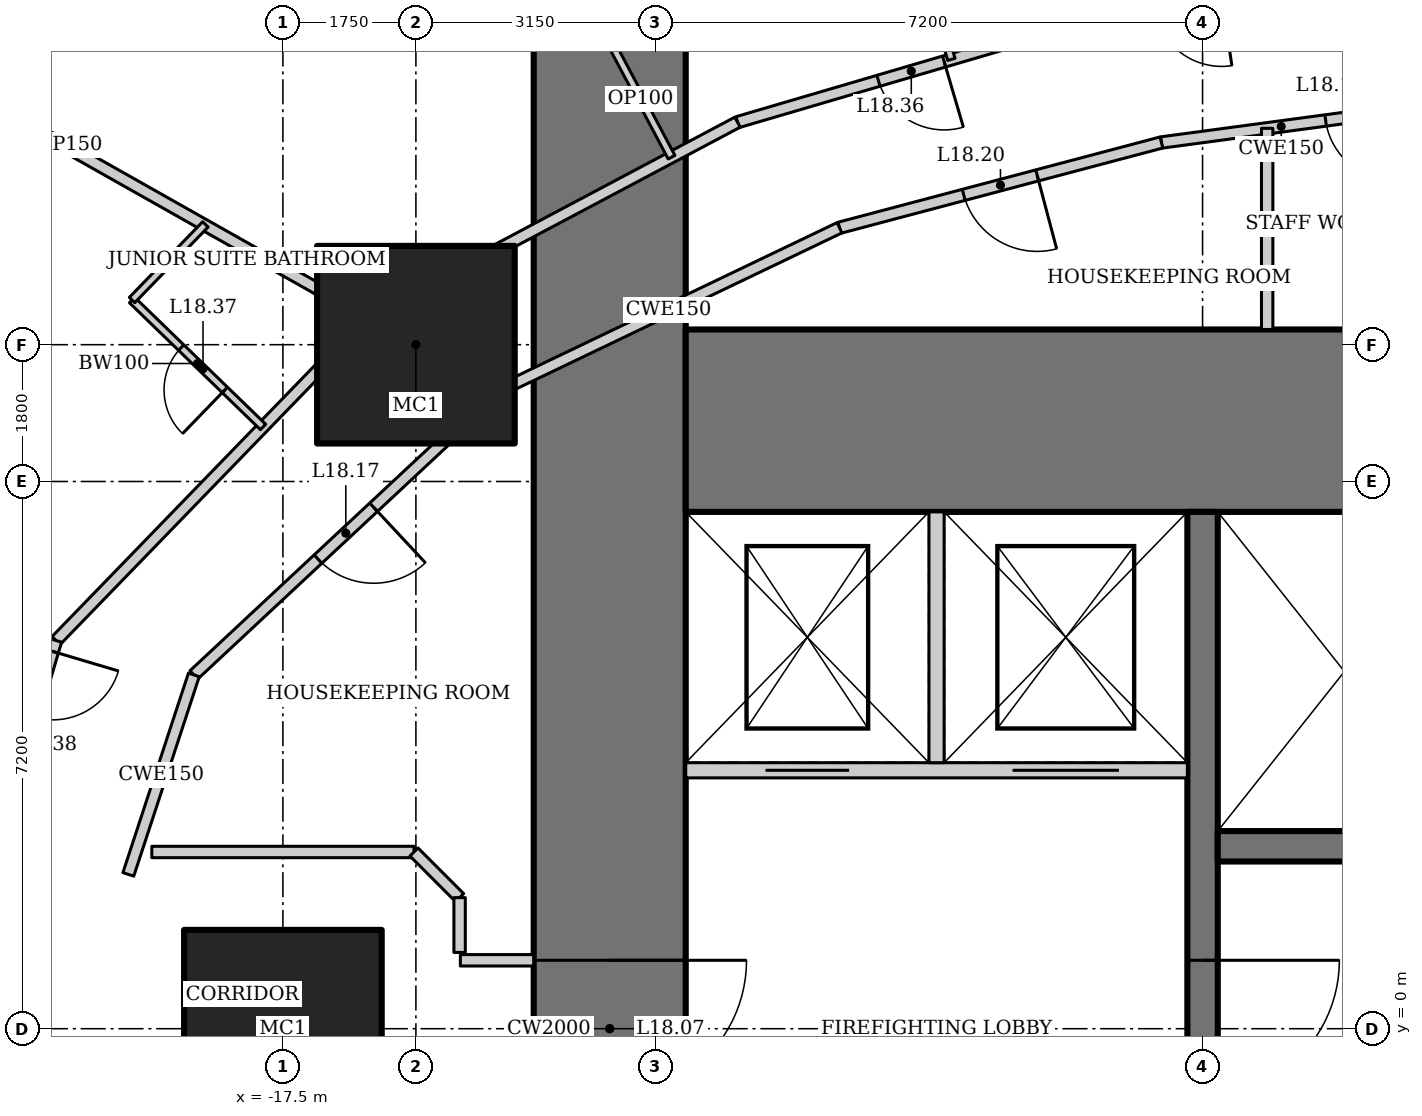
"""IFC4 building model, lengths in metres.
Left out: names, types, materials, properties, quantities, classifications, styles, units other than length and angle.
Written with IfcOpenShell. Run it as: python <this file> out.ifc"""

import sys

from ifc_helpers import new_model, si_unit, direction, frame, frame_2d, origin, origin_2d, place, context, subcontext, project, spatial, rectangle, hollow_rectangle, extrude, element, fill, save


model = new_model("IFC4")
c1 = context("Model", 3, precision=1e-05, world=origin(), true_north=direction((0.0, 1.0)))
c2 = subcontext(c1, "Body", "Model", "MODEL_VIEW")
j1 = project(units=[si_unit("LENGTHUNIT", "METRE"), si_unit("PLANEANGLEUNIT", "RADIAN")], contexts=[c1])
p1 = place(None, origin())
s1 = spatial("IfcSite", under=j1, at=p1, CompositionType="ELEMENT")
p2 = place(p1, origin())
s2 = spatial("IfcBuilding", under=s1, at=p2, CompositionType="ELEMENT")
p3 = place(p2, frame((0.0, 0.0, 80.2)))
s3 = spatial("IfcBuildingStorey", under=s2, at=p3, CompositionType="ELEMENT", Elevation=80.2)
for number, where, z_axis, x_axis in (
    (1, (-15.75, 9.0, 0.0), (0.0, 0.0, 1.0), (1.0, 0.0, 0.0)),
    (2, (-17.5, 0.0, 0.0), (0.0, 0.0, 1.0), (1.0, 0.0, 0.0)),
):
    element("IfcColumn", number, at=place(p3, frame(where, z_axis=z_axis, x_axis=x_axis)), inside=s3, PredefinedType="COLUMN", context=c2, shape_type="SweptSolid", body=[
        extrude(hollow_rectangle(XDim=2.6, YDim=2.6, WallThickness=0.13, at=origin_2d()), origin(), (0.0, 0.0, 1.0), 3.6),
    ])
p4 = place(p3, frame((-13.2, 13.0, 0.0), z_axis=(0.0, 0.0, 1.0), x_axis=(0.0, -1.0, 0.0)))
e3 = element("IfcWall", 3, at=p4, inside=s3, PredefinedType="SHEAR", context=c2, shape_type="SweptSolid", body=[
    extrude(rectangle(XDim=26.0, YDim=2.0, at=frame_2d((13.0, 0.0))), origin(), (0.0, 0.0, 1.0), 3.6),
])
p5 = place(p4, frame((12.1, 0.0, 0.0)))
e4 = element("IfcOpeningElement", 4, at=p5, cuts=e3, PredefinedType="OPENING", context=c2, shape_type="SweptSolid", body=[
    extrude(rectangle(XDim=1.8, YDim=2.1, at=frame_2d((0.9, 1.05))), frame((0.0, 1.01, 0.0), z_axis=(0.0, -1.0, 0.0), x_axis=(1.0, 0.0, 0.0)), (0.0, 0.0, 1.0), 2.02),
])
p6 = place(p3, frame((12.2, 8.0, 0.0), z_axis=(0.0, 0.0, 1.0), x_axis=(-1.0, 0.0, 0.0)))
e5 = element("IfcWall", 5, at=p6, inside=s3, PredefinedType="SHEAR", context=c2, shape_type="SweptSolid", body=[
    extrude(rectangle(XDim=24.4, YDim=2.4, at=frame_2d((12.2, 0.0))), origin(), (0.0, 0.0, 1.0), 3.6),
])
p7 = place(p3, frame((-5.4, 6.8, 0.0), z_axis=(0.0, 0.0, 1.0), x_axis=(0.0, -1.0, 0.0)))
e6 = element("IfcWall", 6, at=p7, inside=s3, PredefinedType="SHEAR", context=c2, shape_type="SweptSolid", body=[
    extrude(rectangle(XDim=13.6, YDim=0.4, at=frame_2d((6.8, 0.0))), origin(), (0.0, 0.0, 1.0), 3.6),
])
p8 = place(p7, frame((5.9, 0.0, 0.0)))
e7 = element("IfcOpeningElement", 7, at=p8, cuts=e6, PredefinedType="OPENING", context=c2, shape_type="SweptSolid", body=[
    extrude(rectangle(XDim=1.8, YDim=2.1, at=frame_2d((0.9, 1.05))), frame((0.0, 0.21, 0.0), z_axis=(0.0, -1.0, 0.0), x_axis=(1.0, 0.0, 0.0)), (0.0, 0.0, 1.0), 0.42),
])
p9 = place(p3, frame((5.2, 2.4, 0.0), z_axis=(0.0, 0.0, 1.0), x_axis=(-1.0, 0.0, 0.0)))
e8 = element("IfcWall", 8, at=p9, inside=s3, PredefinedType="SHEAR", context=c2, shape_type="SweptSolid", body=[
    extrude(rectangle(XDim=10.4, YDim=0.4, at=frame_2d((5.2, 0.0))), origin(), (0.0, 0.0, 1.0), 3.6),
])
p10 = place(p3, frame((-12.2, 3.4, 0.0), z_axis=(0.0, 0.0, 1.0), x_axis=(1.0, 0.0, 0.0)))
e9 = element("IfcWall", 9, at=p10, inside=s3, PredefinedType="SOLIDWALL", context=c2, shape_type="SweptSolid", body=[
    extrude(rectangle(XDim=6.6, YDim=0.2, at=frame_2d((3.3, 0.0))), origin(), (0.0, 0.0, 1.0), 3.6),
])
p11 = place(p10, frame((1.05, 0.0, 0.0)))
e10 = element("IfcOpeningElement", 10, at=p11, cuts=e9, PredefinedType="OPENING", context=c2, shape_type="SweptSolid", body=[
    extrude(rectangle(XDim=1.1, YDim=2.2, at=frame_2d((0.55, 1.1))), frame((0.0, 0.11, 0.0), z_axis=(0.0, -1.0, 0.0), x_axis=(1.0, 0.0, 0.0)), (0.0, 0.0, 1.0), 0.22),
])
p12 = place(p10, frame((4.3, 0.0, 0.0)))
e11 = element("IfcOpeningElement", 11, at=p12, cuts=e9, PredefinedType="OPENING", context=c2, shape_type="SweptSolid", body=[
    extrude(rectangle(XDim=1.4, YDim=2.2, at=frame_2d((0.7, 1.1))), frame((0.0, 0.11, 0.0), z_axis=(0.0, -1.0, 0.0), x_axis=(1.0, 0.0, 0.0)), (0.0, 0.0, 1.0), 0.22),
])
p13 = place(p3, frame((-8.9, 3.5, 0.0), z_axis=(0.0, 0.0, 1.0), x_axis=(0.0, 1.0, 0.0)))
e12 = element("IfcWall", 12, at=p13, inside=s3, PredefinedType="SOLIDWALL", context=c2, shape_type="SweptSolid", body=[
    extrude(rectangle(XDim=3.3, YDim=0.2, at=frame_2d((1.65, 0.0))), origin(), (0.0, 0.0, 1.0), 3.6),
])
p14 = place(p3, frame((-24.435, 13.909, 0.0), z_axis=(0.0, 0.0, 1.0), x_axis=(0.870744406136, -0.491735883563, 0.0)))
e13 = element("IfcWall", 13, at=p14, inside=s3, PredefinedType="PARTITIONING", context=c2, shape_type="SweptSolid", body=[
    extrude(rectangle(XDim=9.263, YDim=0.15, at=frame_2d((4.631, 0.0))), origin(), (0.0, 0.0, 1.0), 2.693),
])
p15 = place(p3, frame((-6.786, 13.317, 0.0), z_axis=(0.0, 0.0, 1.0), x_axis=(-0.959496227294, -0.281721475589, 0.0)))
e14 = element("IfcWall", 14, at=p15, inside=s3, PredefinedType="PARTITIONING", context=c2, shape_type="SweptSolid", body=[
    extrude(rectangle(XDim=4.933, YDim=0.15, at=frame_2d((2.466, 0.0))), origin(), (0.0, 0.0, 1.0), 3.45),
])
p16 = place(p15, frame((2.1, 0.0, 0.0)))
e15 = element("IfcOpeningElement", 15, at=p16, cuts=e14, PredefinedType="OPENING", context=c2, shape_type="SweptSolid", body=[
    extrude(rectangle(XDim=0.9, YDim=2.1, at=frame_2d((0.45, 1.05))), frame((0.0, 0.085, 0.0), z_axis=(0.0, -1.0, 0.0), x_axis=(1.0, 0.0, 0.0)), (0.0, 0.0, 1.0), 0.17),
])
p17 = place(p3, frame((-11.519, 11.928, 0.0), z_axis=(0.0, 0.0, 1.0), x_axis=(-0.883334368785, -0.468743419071, 0.0)))
e16 = element("IfcWall", 16, at=p17, inside=s3, PredefinedType="PARTITIONING", context=c2, shape_type="SweptSolid", body=[
    extrude(rectangle(XDim=5.491, YDim=0.15, at=frame_2d((2.746, 0.0))), origin(), (0.0, 0.0, 1.0), 3.45),
])
p18 = place(p3, frame((-16.369, 9.354, 0.0), z_axis=(0.0, 0.0, 1.0), x_axis=(-0.695871090686, -0.71816671125, 0.0)))
e17 = element("IfcWall", 17, at=p18, inside=s3, PredefinedType="PARTITIONING", context=c2, shape_type="SweptSolid", body=[
    extrude(rectangle(XDim=5.913, YDim=0.15, at=frame_2d((2.957, 0.0))), origin(), (0.0, 0.0, 1.0), 3.45),
])
p19 = place(p3, frame((-20.484, 5.107, 0.0), z_axis=(0.0, 0.0, 1.0), x_axis=(-0.284584469409, -0.95865096869, 0.0)))
e18 = element("IfcWall", 18, at=p19, inside=s3, PredefinedType="PARTITIONING", context=c2, shape_type="SweptSolid", body=[
    extrude(rectangle(XDim=5.327, YDim=0.15, at=frame_2d((2.664, 0.0))), origin(), (0.0, 0.0, 1.0), 3.45),
])
p20 = place(p19, frame((0.15, 0.0, 0.0)))
e19 = element("IfcOpeningElement", 19, at=p20, cuts=e18, PredefinedType="OPENING", context=c2, shape_type="SweptSolid", body=[
    extrude(rectangle(XDim=0.9, YDim=2.1, at=frame_2d((0.45, 1.05))), frame((0.0, 0.085, 0.0), z_axis=(0.0, -1.0, 0.0), x_axis=(1.0, 0.0, 0.0)), (0.0, 0.0, 1.0), 0.17),
])
p21 = place(p3, frame((-22.0, 0.0, 0.0), z_axis=(0.0, 0.0, 1.0), x_axis=(0.284584469409, -0.95865096869, 0.0)))
e20 = element("IfcWall", 20, at=p21, inside=s3, PredefinedType="PARTITIONING", context=c2, shape_type="SweptSolid", body=[
    extrude(rectangle(XDim=5.327, YDim=0.15, at=frame_2d((2.664, 0.0))), origin(), (0.0, 0.0, 1.0), 3.45),
])
p22 = place(p3, frame((-2.79, 12.083, 0.0), z_axis=(0.0, 0.0, 1.0), x_axis=(-0.991129053928, -0.13290296633, 0.0)))
e21 = element("IfcWall", 21, at=p22, inside=s3, PredefinedType="PARTITIONING", context=c2, shape_type="SweptSolid", body=[
    extrude(rectangle(XDim=3.18, YDim=0.15, at=frame_2d((1.59, 0.0))), origin(), (0.0, 0.0, 1.0), 3.45),
])
p23 = place(p22, frame((0.1, 0.0, 0.0)))
e22 = element("IfcOpeningElement", 22, at=p23, cuts=e21, PredefinedType="OPENING", context=c2, shape_type="SweptSolid", body=[
    extrude(rectangle(XDim=0.9, YDim=2.1, at=frame_2d((0.45, 1.05))), frame((0.0, 0.085, 0.0), z_axis=(0.0, -1.0, 0.0), x_axis=(1.0, 0.0, 0.0)), (0.0, 0.0, 1.0), 0.17),
])
p24 = place(p3, frame((-5.941, 11.66, 0.0), z_axis=(0.0, 0.0, 1.0), x_axis=(-0.966672790407, -0.256015070428, 0.0)))
e23 = element("IfcWall", 23, at=p24, inside=s3, PredefinedType="PARTITIONING", context=c2, shape_type="SweptSolid", body=[
    extrude(rectangle(XDim=4.382, YDim=0.15, at=frame_2d((2.191, 0.0))), origin(), (0.0, 0.0, 1.0), 3.45),
])
p25 = place(p24, frame((1.691, 0.0, 0.0)))
e24 = element("IfcOpeningElement", 24, at=p25, cuts=e23, PredefinedType="OPENING", context=c2, shape_type="SweptSolid", body=[
    extrude(rectangle(XDim=1.0, YDim=2.1, at=frame_2d((0.5, 1.05))), frame((0.0, 0.085, 0.0), z_axis=(0.0, -1.0, 0.0), x_axis=(1.0, 0.0, 0.0)), (0.0, 0.0, 1.0), 0.17),
])
p26 = place(p3, frame((-10.177, 10.539, 0.0), z_axis=(0.0, 0.0, 1.0), x_axis=(-0.901869692799, -0.43200816799, 0.0)))
e25 = element("IfcWall", 25, at=p26, inside=s3, PredefinedType="PARTITIONING", context=c2, shape_type="SweptSolid", body=[
    extrude(rectangle(XDim=4.986, YDim=0.15, at=frame_2d((2.493, 0.0))), origin(), (0.0, 0.0, 1.0), 3.45),
])
p27 = place(p3, frame((-14.673, 8.385, 0.0), z_axis=(0.0, 0.0, 1.0), x_axis=(-0.731260145007, -0.682098673452, 0.0)))
e26 = element("IfcWall", 26, at=p27, inside=s3, PredefinedType="PARTITIONING", context=c2, shape_type="SweptSolid", body=[
    extrude(rectangle(XDim=5.468, YDim=0.15, at=frame_2d((2.734, 0.0))), origin(), (0.0, 0.0, 1.0), 3.45),
])
p28 = place(p27, frame((2.234, 0.0, 0.0)))
e27 = element("IfcOpeningElement", 27, at=p28, cuts=e26, PredefinedType="OPENING", context=c2, shape_type="SweptSolid", body=[
    extrude(rectangle(XDim=1.0, YDim=2.1, at=frame_2d((0.5, 1.05))), frame((0.0, 0.085, 0.0), z_axis=(0.0, -1.0, 0.0), x_axis=(1.0, 0.0, 0.0)), (0.0, 0.0, 1.0), 0.17),
])
p29 = place(p3, frame((-4.55, 9.2, 0.0), z_axis=(0.0, 0.0, 1.0), x_axis=(0.0, 1.0, 0.0)))
e28 = element("IfcWall", 28, at=p29, inside=s3, PredefinedType="SOLIDWALL", context=c2, shape_type="SweptSolid", body=[
    extrude(rectangle(XDim=2.647, YDim=0.15, at=frame_2d((1.323, 0.0))), origin(), (0.0, 0.0, 1.0), 3.45),
])
p30 = place(p3, frame((-8.705, 12.754, 0.0), z_axis=(0.0, 0.0, 1.0), x_axis=(-0.281659633817, 0.959514382736, 0.0)))
e29 = element("IfcWall", 29, at=p30, inside=s3, PredefinedType="PARTITIONING", context=c2, shape_type="SweptSolid", body=[
    extrude(rectangle(XDim=2.4, YDim=0.1, at=frame_2d((1.2, 0.0))), origin(), (0.0, 0.0, 1.0), 3.45),
])
p31 = place(p30, frame((0.7, 0.0, 0.0)))
e30 = element("IfcOpeningElement", 30, at=p31, cuts=e29, PredefinedType="OPENING", context=c2, shape_type="SweptSolid", body=[
    extrude(rectangle(XDim=0.8, YDim=2.1, at=frame_2d((0.4, 1.05))), frame((0.0, 0.06, 0.0), z_axis=(0.0, -1.0, 0.0), x_axis=(1.0, 0.0, 0.0)), (0.0, 0.0, 1.0), 0.12),
])
p32 = place(p3, frame((-17.761, 7.917, 0.0), z_axis=(0.0, 0.0, 1.0), x_axis=(-0.718157610206, 0.695880483204, 0.0)))
e31 = element("IfcWall", 31, at=p32, inside=s3, PredefinedType="PARTITIONING", context=c2, shape_type="SweptSolid", body=[
    extrude(rectangle(XDim=2.4, YDim=0.1, at=frame_2d((1.2, 0.0))), origin(), (0.0, 0.0, 1.0), 3.45),
])
p33 = place(p32, frame((0.7, 0.0, 0.0)))
e32 = element("IfcOpeningElement", 32, at=p33, cuts=e31, PredefinedType="OPENING", context=c2, shape_type="SweptSolid", body=[
    extrude(rectangle(XDim=0.8, YDim=2.1, at=frame_2d((0.4, 1.05))), frame((0.0, 0.06, 0.0), z_axis=(0.0, -1.0, 0.0), x_axis=(1.0, 0.0, 0.0)), (0.0, 0.0, 1.0), 0.12),
])
p34 = place(p3, frame((-19.484, 9.588, 0.0), z_axis=(0.0, 0.0, 1.0), x_axis=(0.695920174922, 0.718119147591, 0.0)))
e33 = element("IfcWall", 33, at=p34, inside=s3, PredefinedType="PARTITIONING", context=c2, shape_type="SweptSolid", body=[
    extrude(rectangle(XDim=1.386, YDim=0.1, at=frame_2d((0.693, 0.0))), origin(), (0.0, 0.0, 1.0), 3.45),
])
p35 = place(p3, frame((-13.2, 13.0, 0.0), z_axis=(0.0, 0.0, 1.0), x_axis=(0.46874717052, -0.88333237806, 0.0)))
e34 = element("IfcWall", 34, at=p35, inside=s3, PredefinedType="PARTITIONING", context=c2, shape_type="SweptSolid", body=[
    extrude(rectangle(XDim=1.735, YDim=0.1, at=frame_2d((0.868, 0.0))), origin(), (0.0, 0.0, 1.0), 3.45),
])
p36 = place(p3, frame((-18.672, 4.655, 0.0), z_axis=(0.0, 0.0, 1.0), x_axis=(-0.311929965981, -0.950105097515, 0.0)))
e35 = element("IfcWall", 35, at=p36, inside=s3, PredefinedType="PARTITIONING", context=c2, shape_type="SweptSolid", body=[
    extrude(rectangle(XDim=2.763, YDim=0.15, at=frame_2d((1.381, 0.0))), origin(), (0.0, 0.0, 1.0), 3.45),
])
p37 = place(p3, frame((-14.2, 0.9, 0.0), z_axis=(0.0, 0.0, 1.0), x_axis=(-1.0, 0.0, 0.0)))
e36 = element("IfcWall", 36, at=p37, inside=s3, PredefinedType="PARTITIONING", context=c2, shape_type="SweptSolid", body=[
    extrude(rectangle(XDim=0.965, YDim=0.15, at=frame_2d((0.482, 0.0))), origin(), (0.0, 0.0, 1.0), 3.45),
])
p38 = place(p3, frame((-19.225, 2.325, 0.0), z_axis=(0.0, 0.0, 1.0), x_axis=(1.0, 0.0, 0.0)))
e37 = element("IfcWall", 37, at=p38, inside=s3, PredefinedType="PARTITIONING", context=c2, shape_type="SweptSolid", body=[
    extrude(rectangle(XDim=3.449, YDim=0.15, at=frame_2d((1.725, 0.0))), origin(), (0.0, 0.0, 1.0), 3.45),
])
p39 = place(p3, frame((-15.775, 2.325, 0.0), z_axis=(0.0, 0.0, 1.0), x_axis=(0.707106781187, -0.707106781187, 0.0)))
e38 = element("IfcWall", 38, at=p39, inside=s3, PredefinedType="PARTITIONING", context=c2, shape_type="SweptSolid", body=[
    extrude(rectangle(XDim=0.849, YDim=0.15, at=frame_2d((0.425, 0.0))), origin(), (0.0, 0.0, 1.0), 3.45),
])
p40 = place(p3, frame((-15.175, 1.725, 0.0), z_axis=(0.0, 0.0, 1.0), x_axis=(0.0, -1.0, 0.0)))
e39 = element("IfcWall", 39, at=p40, inside=s3, PredefinedType="PARTITIONING", context=c2, shape_type="SweptSolid", body=[
    extrude(rectangle(XDim=0.721, YDim=0.15, at=frame_2d((0.361, 0.0))), origin(), (0.0, 0.0, 1.0), 3.45),
])
p41 = place(p8, origin())
e40 = element("IfcDoor", 40, at=p41, inside=s3, OperationType="DOUBLE_DOOR_DOUBLE_SWING", PredefinedType="DOOR", context=c2, shape_type="SweptSolid", body=[
    extrude(rectangle(XDim=1.8, YDim=2.1, at=frame_2d((0.9, 1.05))), frame((0.0, 0.025, 0.0), z_axis=(0.0, -1.0, 0.0), x_axis=(1.0, 0.0, 0.0)), (0.0, 0.0, 1.0), 0.05),
])
fill(e7, e40)
p42 = place(p5, origin())
e41 = element("IfcDoor", 41, at=p42, inside=s3, OperationType="DOUBLE_DOOR_DOUBLE_SWING", PredefinedType="DOOR", context=c2, shape_type="SweptSolid", body=[
    extrude(rectangle(XDim=1.8, YDim=2.1, at=frame_2d((0.9, 1.05))), frame((0.0, 0.025, 0.0), z_axis=(0.0, -1.0, 0.0), x_axis=(1.0, 0.0, 0.0)), (0.0, 0.0, 1.0), 0.05),
])
fill(e4, e41)
p43 = place(p11, origin())
e42 = element("IfcDoor", 42, at=p43, inside=s3, OperationType="DOUBLE_DOOR_SLIDING", PredefinedType="DOOR", context=c2, shape_type="SweptSolid", body=[
    extrude(rectangle(XDim=1.1, YDim=2.2, at=frame_2d((0.55, 1.1))), frame((0.0, 0.025, 0.0), z_axis=(0.0, -1.0, 0.0), x_axis=(1.0, 0.0, 0.0)), (0.0, 0.0, 1.0), 0.05),
])
fill(e10, e42)
p44 = place(p12, origin())
e43 = element("IfcDoor", 43, at=p44, inside=s3, OperationType="DOUBLE_DOOR_SLIDING", PredefinedType="DOOR", context=c2, shape_type="SweptSolid", body=[
    extrude(rectangle(XDim=1.4, YDim=2.2, at=frame_2d((0.7, 1.1))), frame((0.0, 0.025, 0.0), z_axis=(0.0, -1.0, 0.0), x_axis=(1.0, 0.0, 0.0)), (0.0, 0.0, 1.0), 0.05),
])
fill(e11, e43)
p45 = place(p28, origin())
e44 = element("IfcDoor", 44, at=p45, inside=s3, OperationType="SINGLE_SWING_LEFT", PredefinedType="DOOR", context=c2, shape_type="SweptSolid", body=[
    extrude(rectangle(XDim=1.0, YDim=2.1, at=frame_2d((0.5, 1.05))), frame((0.0, 0.025, 0.0), z_axis=(0.0, -1.0, 0.0), x_axis=(1.0, 0.0, 0.0)), (0.0, 0.0, 1.0), 0.05),
])
fill(e27, e44)
p46 = place(p23, origin())
e45 = element("IfcDoor", 45, at=p46, inside=s3, OperationType="SINGLE_SWING_LEFT", PredefinedType="DOOR", context=c2, shape_type="SweptSolid", body=[
    extrude(rectangle(XDim=0.9, YDim=2.1, at=frame_2d((0.45, 1.05))), frame((0.0, 0.025, 0.0), z_axis=(0.0, -1.0, 0.0), x_axis=(1.0, 0.0, 0.0)), (0.0, 0.0, 1.0), 0.05),
])
fill(e22, e45)
p47 = place(p25, origin())
e46 = element("IfcDoor", 46, at=p47, inside=s3, OperationType="SINGLE_SWING_LEFT", PredefinedType="DOOR", context=c2, shape_type="SweptSolid", body=[
    extrude(rectangle(XDim=1.0, YDim=2.1, at=frame_2d((0.5, 1.05))), frame((0.0, 0.025, 0.0), z_axis=(0.0, -1.0, 0.0), x_axis=(1.0, 0.0, 0.0)), (0.0, 0.0, 1.0), 0.05),
])
fill(e24, e46)
p48 = place(p16, origin())
e47 = element("IfcDoor", 47, at=p48, inside=s3, OperationType="SINGLE_SWING_LEFT", PredefinedType="DOOR", context=c2, shape_type="SweptSolid", body=[
    extrude(rectangle(XDim=0.9, YDim=2.1, at=frame_2d((0.45, 1.05))), frame((0.0, 0.025, 0.0), z_axis=(0.0, -1.0, 0.0), x_axis=(1.0, 0.0, 0.0)), (0.0, 0.0, 1.0), 0.05),
])
fill(e15, e47)
p49 = place(p33, origin())
e48 = element("IfcDoor", 48, at=p49, inside=s3, OperationType="SINGLE_SWING_LEFT", PredefinedType="DOOR", context=c2, shape_type="SweptSolid", body=[
    extrude(rectangle(XDim=0.8, YDim=2.1, at=frame_2d((0.4, 1.05))), frame((0.0, 0.025, 0.0), z_axis=(0.0, -1.0, 0.0), x_axis=(1.0, 0.0, 0.0)), (0.0, 0.0, 1.0), 0.05),
])
fill(e32, e48)
p50 = place(p20, origin())
e49 = element("IfcDoor", 49, at=p50, inside=s3, OperationType="SINGLE_SWING_LEFT", PredefinedType="DOOR", context=c2, shape_type="SweptSolid", body=[
    extrude(rectangle(XDim=0.9, YDim=2.1, at=frame_2d((0.45, 1.05))), frame((0.0, 0.025, 0.0), z_axis=(0.0, -1.0, 0.0), x_axis=(1.0, 0.0, 0.0)), (0.0, 0.0, 1.0), 0.05),
])
fill(e19, e49)
save(model, sys.argv[1])
